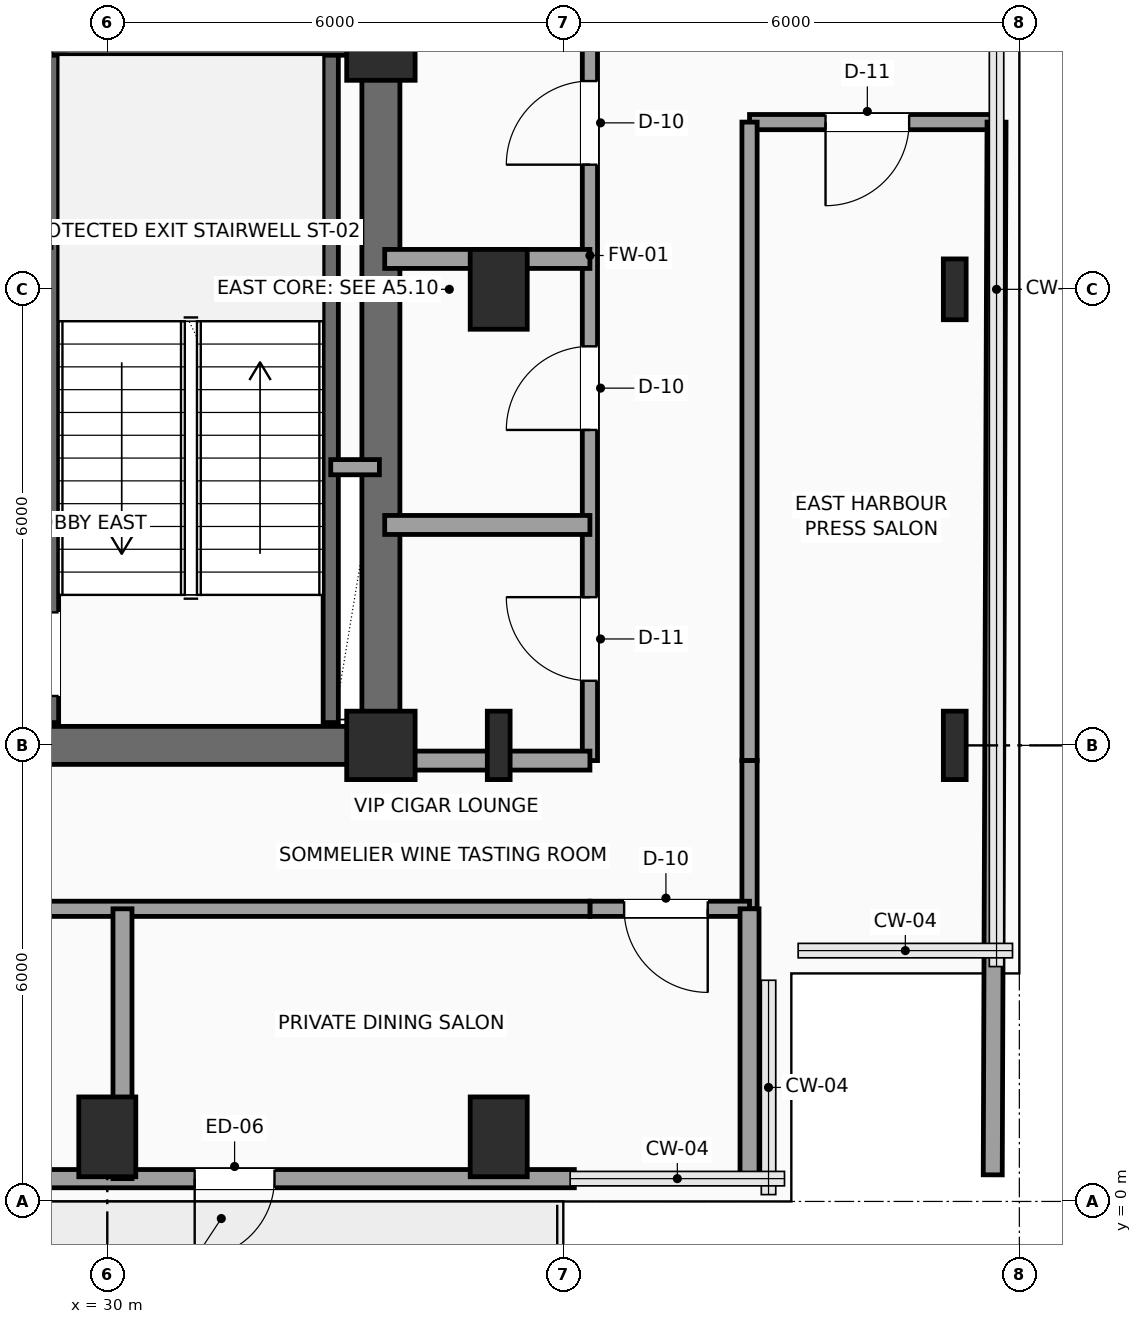
"""IFC4 building model, lengths in metres.
Left out: names, types, materials, properties, quantities, classifications, styles, units other than length and angle.
Written with IfcOpenShell. Run it as: python <this file> out.ifc"""

import sys

from ifc_helpers import new_model, si_unit, direction, frame, frame_2d, origin, origin_2d, place, context, subcontext, project, spatial, rectangle, i_section, extrude, element, fill, save


model = new_model("IFC4")
c1 = context("Model", 3, precision=1e-05, world=origin(), true_north=direction((0.0, 1.0)))
c2 = subcontext(c1, "Body", "Model", "MODEL_VIEW")
j1 = project(units=[si_unit("LENGTHUNIT", "METRE"), si_unit("PLANEANGLEUNIT", "RADIAN")], contexts=[c1])
p1 = place(None, origin())
s1 = spatial("IfcSite", under=j1, at=p1, CompositionType="ELEMENT")
p2 = place(p1, origin())
s2 = spatial("IfcBuilding", under=s1, at=p2, CompositionType="ELEMENT")
p3 = place(p2, frame((0.0, 0.0, 180.45)))
s3 = spatial("IfcBuildingStorey", under=s2, at=p3, CompositionType="ELEMENT", Elevation=180.45)
for number, where, z_axis, x_axis in (
    (1, (33.6, 6.0, 0.0), (0.0, 0.0, 1.0), (1.0, 0.0, 0.0)),
    (2, (33.6, 15.2, 0.0), (0.0, 0.0, 1.0), (1.0, 0.0, 0.0)),
):
    element("IfcColumn", number, at=place(p3, frame(where, z_axis=z_axis, x_axis=x_axis)), inside=s3, PredefinedType="COLUMN", context=c2, shape_type="SweptSolid", body=[
        extrude(rectangle(XDim=0.9, YDim=0.9, at=origin_2d()), origin(), (0.0, 0.0, 1.0), 3.75),
    ])
for number, where, z_axis, x_axis in (
    (3, (30.0, 0.85, 0.0), (0.0, 0.0, 1.0), (1.0, 0.0, 0.0)),
    (4, (35.15, 0.85, 0.0), (0.0, 0.0, 1.0), (1.0, 0.0, 0.0)),
):
    element("IfcColumn", number, at=place(p3, frame(where, z_axis=z_axis, x_axis=x_axis)), inside=s3, PredefinedType="COLUMN", context=c2, shape_type="SweptSolid", body=[
        extrude(rectangle(XDim=0.75, YDim=1.05, at=origin_2d()), origin(), (0.0, 0.0, 1.0), 3.75),
    ])
p4 = place(p3, frame((35.15, 6.0, 0.0), z_axis=(0.0, 0.0, 1.0), x_axis=(1.0, 0.0, 0.0)))
e5 = element("IfcColumn", 5, at=p4, inside=s3, PredefinedType="COLUMN", context=c2, shape_type="SweptSolid", body=[
    extrude(i_section(OverallWidth=0.3, OverallDepth=0.9, WebThickness=0.019, FlangeThickness=0.035, FilletRadius=0.03, at=origin_2d()), origin(), (0.0, 0.0, 1.0), 3.75),
])
p5 = place(p3, frame((35.15, 12.0, 0.0), z_axis=(0.0, 0.0, 1.0), x_axis=(1.0, 0.0, 0.0)))
e6 = element("IfcColumn", 6, at=p5, inside=s3, PredefinedType="COLUMN", context=c2, shape_type="SweptSolid", body=[
    extrude(rectangle(XDim=0.75, YDim=1.05, at=origin_2d()), origin(), (0.0, 0.0, 1.0), 3.75),
])
p6 = place(p3, frame((41.15, 6.0, 0.0), z_axis=(0.0, 0.0, 1.0), x_axis=(1.0, 0.0, 0.0)))
e7 = element("IfcColumn", 7, at=p6, inside=s3, PredefinedType="COLUMN", context=c2, shape_type="SweptSolid", body=[
    extrude(i_section(OverallWidth=0.3, OverallDepth=0.9, WebThickness=0.019, FlangeThickness=0.035, FilletRadius=0.03, at=origin_2d()), origin(), (0.0, 0.0, 1.0), 3.75),
])
p7 = place(p3, frame((41.15, 12.0, 0.0), z_axis=(0.0, 0.0, 1.0), x_axis=(1.0, 0.0, 0.0)))
e8 = element("IfcColumn", 8, at=p7, inside=s3, PredefinedType="COLUMN", context=c2, shape_type="SweptSolid", body=[
    extrude(i_section(OverallWidth=0.3, OverallDepth=0.8, WebThickness=0.018, FlangeThickness=0.033, FilletRadius=0.03, at=origin_2d()), origin(), (0.0, 0.0, 1.0), 3.75),
])
p8 = place(p3, frame((36.145, 0.3, 0.0), z_axis=(0.0, 0.0, 1.0), x_axis=(-1.0, 0.0, 0.0)))
e9 = element("IfcWall", 9, at=p8, inside=s3, PredefinedType="SOLIDWALL", context=c2, shape_type="SweptSolid", body=[
    extrude(rectangle(XDim=9.29, YDim=0.24, at=frame_2d((4.645, 0.0))), origin(), (0.0, 0.0, 1.0), 3.54),
])
p9 = place(p8, frame((3.945, 0.0, 0.0)))
e10 = element("IfcOpeningElement", 10, at=p9, cuts=e9, PredefinedType="OPENING", context=c2, shape_type="SweptSolid", body=[
    extrude(rectangle(XDim=1.05, YDim=2.2, at=frame_2d((0.525, 1.1))), frame((0.0, 0.13, 0.0), z_axis=(0.0, -1.0, 0.0), x_axis=(1.0, 0.0, 0.0)), (0.0, 0.0, 1.0), 0.26),
])
p10 = place(p3, frame((24.0, 6.0, 0.0), z_axis=(0.0, 0.0, 1.0), x_axis=(1.0, 0.0, 0.0)))
e11 = element("IfcWall", 11, at=p10, inside=s3, PredefinedType="SHEAR", context=c2, shape_type="SweptSolid", body=[
    extrude(rectangle(XDim=9.6, YDim=0.5, at=frame_2d((4.8, 0.0))), origin(), (0.0, 0.0, 1.0), 3.54),
])
p11 = place(p3, frame((33.6, 6.0, 0.0), z_axis=(0.0, 0.0, 1.0), x_axis=(0.0, 1.0, 0.0)))
e12 = element("IfcWall", 12, at=p11, inside=s3, PredefinedType="SHEAR", context=c2, shape_type="SweptSolid", body=[
    extrude(rectangle(XDim=12.0, YDim=0.5, at=frame_2d((6.0, 0.0))), origin(), (0.0, 0.0, 1.0), 3.54),
])
p12 = place(p11, frame((10.15, 0.0, 0.0)))
e13 = element("IfcOpeningElement", 13, at=p12, cuts=e12, PredefinedType="OPENING", context=c2, shape_type="SweptSolid", body=[
    extrude(rectangle(XDim=0.9, YDim=2.15, at=frame_2d((0.45, 1.075))), frame((0.0, 0.26, 0.0), z_axis=(0.0, -1.0, 0.0), x_axis=(1.0, 0.0, 0.0)), (0.0, 0.0, 1.0), 0.52),
])
p13 = place(p3, frame((29.26, 6.3, 0.0), z_axis=(0.0, 0.0, 1.0), x_axis=(0.0, 1.0, 0.0)))
e14 = element("IfcWall", 14, at=p13, inside=s3, PredefinedType="SHEAR", context=c2, shape_type="SweptSolid", body=[
    extrude(rectangle(XDim=8.88, YDim=0.2, at=frame_2d((4.44, 0.0))), origin(), (0.0, 0.0, 1.0), 3.54),
])
p14 = place(p13, frame((0.35, 0.0, 0.0)))
e15 = element("IfcOpeningElement", 15, at=p14, cuts=e14, PredefinedType="OPENING", context=c2, shape_type="SweptSolid", body=[
    extrude(rectangle(XDim=1.1, YDim=2.2, at=frame_2d((0.55, 1.1))), frame((0.0, 0.11, 0.0), z_axis=(0.0, -1.0, 0.0), x_axis=(1.0, 0.0, 0.0)), (0.0, 0.0, 1.0), 0.22),
])
p15 = place(p3, frame((32.94, 6.3, 0.0), z_axis=(0.0, 0.0, 1.0), x_axis=(0.0, 1.0, 0.0)))
e16 = element("IfcWall", 16, at=p15, inside=s3, PredefinedType="SHEAR", context=c2, shape_type="SweptSolid", body=[
    extrude(rectangle(XDim=8.88, YDim=0.2, at=frame_2d((4.44, 0.0))), origin(), (0.0, 0.0, 1.0), 3.54),
])
p16 = place(p3, frame((29.26, 15.18, 0.0), z_axis=(0.0, 0.0, 1.0), x_axis=(1.0, 0.0, 0.0)))
e17 = element("IfcWall", 17, at=p16, inside=s3, PredefinedType="SHEAR", context=c2, shape_type="SweptSolid", body=[
    extrude(rectangle(XDim=4.04, YDim=0.2, at=frame_2d((2.02, 0.0))), origin(), (0.0, 0.0, 1.0), 3.54),
])
p17 = place(p3, frame((32.94, 9.66, 0.0), z_axis=(0.0, 0.0, 1.0), x_axis=(1.0, 0.0, 0.0)))
e18 = element("IfcWall", 18, at=p17, inside=s3, PredefinedType="SOLIDWALL", context=c2, shape_type="SweptSolid", body=[
    extrude(rectangle(XDim=0.64, YDim=0.2, at=frame_2d((0.32, 0.0))), origin(), (0.0, 0.0, 1.0), 3.54),
])
p18 = place(p3, frame((36.35, 5.8, 0.0), z_axis=(0.0, 0.0, 1.0), x_axis=(0.0, 1.0, 0.0)))
e19 = element("IfcWall", 19, at=p18, inside=s3, PredefinedType="SOLIDWALL", context=c2, shape_type="SweptSolid", body=[
    extrude(rectangle(XDim=10.08, YDim=0.2, at=frame_2d((5.04, 0.0))), origin(), (0.0, 0.0, 1.0), 3.54),
])
p19 = place(p18, frame((1.05, 0.0, 0.0)))
e20 = element("IfcOpeningElement", 20, at=p19, cuts=e19, PredefinedType="OPENING", context=c2, shape_type="SweptSolid", body=[
    extrude(rectangle(XDim=1.1, YDim=2.25, at=frame_2d((0.55, 1.125))), frame((0.0, 0.11, 0.0), z_axis=(0.0, -1.0, 0.0), x_axis=(1.0, 0.0, 0.0)), (0.0, 0.0, 1.0), 0.22),
])
p20 = place(p18, frame((4.35, 0.0, 0.0)))
e21 = element("IfcOpeningElement", 21, at=p20, cuts=e19, PredefinedType="OPENING", context=c2, shape_type="SweptSolid", body=[
    extrude(rectangle(XDim=1.1, YDim=2.25, at=frame_2d((0.55, 1.125))), frame((0.0, 0.11, 0.0), z_axis=(0.0, -1.0, 0.0), x_axis=(1.0, 0.0, 0.0)), (0.0, 0.0, 1.0), 0.22),
])
p21 = place(p18, frame((7.84, 0.0, 0.0)))
e22 = element("IfcOpeningElement", 22, at=p21, cuts=e19, PredefinedType="OPENING", context=c2, shape_type="SweptSolid", body=[
    extrude(rectangle(XDim=1.1, YDim=2.25, at=frame_2d((0.55, 1.125))), frame((0.0, 0.11, 0.0), z_axis=(0.0, -1.0, 0.0), x_axis=(1.0, 0.0, 0.0)), (0.0, 0.0, 1.0), 0.22),
])
p22 = place(p3, frame((41.7, 14.2, 0.0), z_axis=(0.0, 0.0, 1.0), x_axis=(-1.0, 0.0, 0.0)))
e23 = element("IfcWall", 23, at=p22, inside=s3, PredefinedType="SOLIDWALL", context=c2, shape_type="SweptSolid", body=[
    extrude(rectangle(XDim=3.25, YDim=0.2, at=frame_2d((1.625, 0.0))), origin(), (0.0, 0.0, 1.0), 3.54),
])
p23 = place(p22, frame((1.15, 0.0, 0.0)))
e24 = element("IfcOpeningElement", 24, at=p23, cuts=e23, PredefinedType="OPENING", context=c2, shape_type="SweptSolid", body=[
    extrude(rectangle(XDim=1.1, YDim=2.25, at=frame_2d((0.55, 1.125))), frame((0.0, 0.11, 0.0), z_axis=(0.0, -1.0, 0.0), x_axis=(1.0, 0.0, 0.0)), (0.0, 0.0, 1.0), 0.22),
])
p24 = place(p3, frame((38.45, 14.2, 0.0), z_axis=(0.0, 0.0, 1.0), x_axis=(0.0, -1.0, 0.0)))
e25 = element("IfcWall", 25, at=p24, inside=s3, PredefinedType="SOLIDWALL", context=c2, shape_type="SweptSolid", body=[
    extrude(rectangle(XDim=8.4, YDim=0.2, at=frame_2d((4.2, 0.0))), origin(), (0.0, 0.0, 1.0), 3.54),
])
p25 = place(p3, frame((38.45, 5.8, 0.0), z_axis=(0.0, 0.0, 1.0), x_axis=(0.0, -1.0, 0.0)))
e26 = element("IfcWall", 26, at=p25, inside=s3, PredefinedType="SOLIDWALL", context=c2, shape_type="SweptSolid", body=[
    extrude(rectangle(XDim=1.95, YDim=0.2, at=frame_2d((0.975, 0.0))), origin(), (0.0, 0.0, 1.0), 3.54),
])
p26 = place(p3, frame((38.45, 3.85, 0.0), z_axis=(0.0, 0.0, 1.0), x_axis=(-1.0, 0.0, 0.0)))
e27 = element("IfcWall", 27, at=p26, inside=s3, PredefinedType="SOLIDWALL", context=c2, shape_type="SweptSolid", body=[
    extrude(rectangle(XDim=2.1, YDim=0.2, at=frame_2d((1.05, 0.0))), origin(), (0.0, 0.0, 1.0), 3.54),
])
p27 = place(p26, frame((0.55, 0.0, 0.0)))
e28 = element("IfcOpeningElement", 28, at=p27, cuts=e27, PredefinedType="OPENING", context=c2, shape_type="SweptSolid", body=[
    extrude(rectangle(XDim=1.1, YDim=2.25, at=frame_2d((0.55, 1.125))), frame((0.0, 0.11, 0.0), z_axis=(0.0, -1.0, 0.0), x_axis=(1.0, 0.0, 0.0)), (0.0, 0.0, 1.0), 0.22),
])
p28 = place(p3, frame((36.35, 3.85, 0.0), z_axis=(0.0, 0.0, 1.0), x_axis=(-1.0, 0.0, 0.0)))
e29 = element("IfcWall", 29, at=p28, inside=s3, PredefinedType="SOLIDWALL", context=c2, shape_type="SweptSolid", body=[
    extrude(rectangle(XDim=12.4, YDim=0.2, at=frame_2d((6.2, 0.0))), origin(), (0.0, 0.0, 1.0), 3.54),
])
p29 = place(p28, frame((8.775, 0.0, 0.0)))
e30 = element("IfcOpeningElement", 30, at=p29, cuts=e29, PredefinedType="OPENING", context=c2, shape_type="SweptSolid", body=[
    extrude(rectangle(XDim=1.1, YDim=2.25, at=frame_2d((0.55, 1.125))), frame((0.0, 0.11, 0.0), z_axis=(0.0, -1.0, 0.0), x_axis=(1.0, 0.0, 0.0)), (0.0, 0.0, 1.0), 0.22),
])
p30 = place(p3, frame((30.2, 0.3, 0.0), z_axis=(0.0, 0.0, 1.0), x_axis=(0.0, 1.0, 0.0)))
e31 = element("IfcWall", 31, at=p30, inside=s3, PredefinedType="PARTITIONING", context=c2, shape_type="SweptSolid", body=[
    extrude(rectangle(XDim=3.55, YDim=0.25, at=frame_2d((1.775, 0.0))), origin(), (0.0, 0.0, 1.0), 3.217),
])
p31 = place(p3, frame((38.45, 0.3, 0.0), z_axis=(0.0, 0.0, 1.0), x_axis=(0.0, 1.0, 0.0)))
e32 = element("IfcWall", 32, at=p31, inside=s3, PredefinedType="PARTITIONING", context=c2, shape_type="SweptSolid", body=[
    extrude(rectangle(XDim=3.55, YDim=0.25, at=frame_2d((1.775, 0.0))), origin(), (0.0, 0.0, 1.0), 3.54),
])
for number, where, z_axis, x_axis in (
    (33, (33.65, 5.8, 0.0), (0.0, 0.0, 1.0), (1.0, 0.0, 0.0)),
    (34, (33.65, 8.9, 0.0), (0.0, 0.0, 1.0), (1.0, 0.0, 0.0)),
):
    element("IfcWall", number, at=place(p3, frame(where, z_axis=z_axis, x_axis=x_axis)), inside=s3, PredefinedType="PARTITIONING", context=c2, shape_type="SweptSolid", body=[
        extrude(rectangle(XDim=2.7, YDim=0.25, at=frame_2d((1.35, 0.0))), origin(), (0.0, 0.0, 1.0), 3.132),
    ])
p32 = place(p3, frame((33.65, 12.4, 0.0), z_axis=(0.0, 0.0, 1.0), x_axis=(1.0, 0.0, 0.0)))
e35 = element("IfcWall", 35, at=p32, inside=s3, PredefinedType="PARTITIONING", context=c2, shape_type="SweptSolid", body=[
    extrude(rectangle(XDim=2.7, YDim=0.25, at=frame_2d((1.35, 0.0))), origin(), (0.0, 0.0, 1.0), 3.54),
])
p33 = place(p3, frame((41.65, 0.35, 0.0), z_axis=(0.0, 0.0, 1.0), x_axis=(0.003613648425, 0.999993470751, 0.0)))
e36 = element("IfcWall", 36, at=p33, inside=s3, PredefinedType="PARTITIONING", context=c2, shape_type="SweptSolid", body=[
    extrude(rectangle(XDim=13.85, YDim=0.25, at=frame_2d((6.925, 0.0))), origin(), (0.0, 0.0, 1.0), 3.54),
])
p34 = place(p9, origin())
e37 = element("IfcDoor", 37, at=p34, inside=s3, OperationType="SINGLE_SWING_RIGHT", PredefinedType="DOOR", context=c2, shape_type="SweptSolid", body=[
    extrude(rectangle(XDim=1.05, YDim=2.2, at=frame_2d((0.525, 1.1))), frame((0.0, 0.025, 0.0), z_axis=(0.0, -1.0, 0.0), x_axis=(1.0, 0.0, 0.0)), (0.0, 0.0, 1.0), 0.05),
])
fill(e10, e37)
p35 = place(p14, origin())
e38 = element("IfcDoor", 38, at=p35, inside=s3, OperationType="SINGLE_SWING_RIGHT", PredefinedType="DOOR", context=c2, shape_type="SweptSolid", body=[
    extrude(rectangle(XDim=1.1, YDim=2.2, at=frame_2d((0.55, 1.1))), frame((0.0, 0.025, 0.0), z_axis=(0.0, -1.0, 0.0), x_axis=(1.0, 0.0, 0.0)), (0.0, 0.0, 1.0), 0.05),
])
fill(e15, e38)
p36 = place(p19, origin())
e39 = element("IfcDoor", 39, at=p36, inside=s3, OperationType="SINGLE_SWING_RIGHT", PredefinedType="DOOR", context=c2, shape_type="SweptSolid", body=[
    extrude(rectangle(XDim=1.1, YDim=2.25, at=frame_2d((0.55, 1.125))), frame((0.0, 0.025, 0.0), z_axis=(0.0, -1.0, 0.0), x_axis=(1.0, 0.0, 0.0)), (0.0, 0.0, 1.0), 0.05),
])
fill(e20, e39)
p37 = place(p20, origin())
e40 = element("IfcDoor", 40, at=p37, inside=s3, OperationType="SINGLE_SWING_LEFT", PredefinedType="DOOR", context=c2, shape_type="SweptSolid", body=[
    extrude(rectangle(XDim=1.1, YDim=2.25, at=frame_2d((0.55, 1.125))), frame((0.0, 0.025, 0.0), z_axis=(0.0, -1.0, 0.0), x_axis=(1.0, 0.0, 0.0)), (0.0, 0.0, 1.0), 0.05),
])
fill(e21, e40)
p38 = place(p21, origin())
e41 = element("IfcDoor", 41, at=p38, inside=s3, OperationType="SINGLE_SWING_LEFT", PredefinedType="DOOR", context=c2, shape_type="SweptSolid", body=[
    extrude(rectangle(XDim=1.1, YDim=2.25, at=frame_2d((0.55, 1.125))), frame((0.0, 0.025, 0.0), z_axis=(0.0, -1.0, 0.0), x_axis=(1.0, 0.0, 0.0)), (0.0, 0.0, 1.0), 0.05),
])
fill(e22, e41)
p39 = place(p23, origin())
e42 = element("IfcDoor", 42, at=p39, inside=s3, OperationType="SINGLE_SWING_RIGHT", PredefinedType="DOOR", context=c2, shape_type="SweptSolid", body=[
    extrude(rectangle(XDim=1.1, YDim=2.25, at=frame_2d((0.55, 1.125))), frame((0.0, 0.025, 0.0), z_axis=(0.0, -1.0, 0.0), x_axis=(1.0, 0.0, 0.0)), (0.0, 0.0, 1.0), 0.05),
])
fill(e24, e42)
p40 = place(p27, origin())
e43 = element("IfcDoor", 43, at=p40, inside=s3, OperationType="SINGLE_SWING_LEFT", PredefinedType="DOOR", context=c2, shape_type="SweptSolid", body=[
    extrude(rectangle(XDim=1.1, YDim=2.25, at=frame_2d((0.55, 1.125))), frame((0.0, 0.025, 0.0), z_axis=(0.0, -1.0, 0.0), x_axis=(1.0, 0.0, 0.0)), (0.0, 0.0, 1.0), 0.05),
])
fill(e28, e43)
save(model, sys.argv[1])
